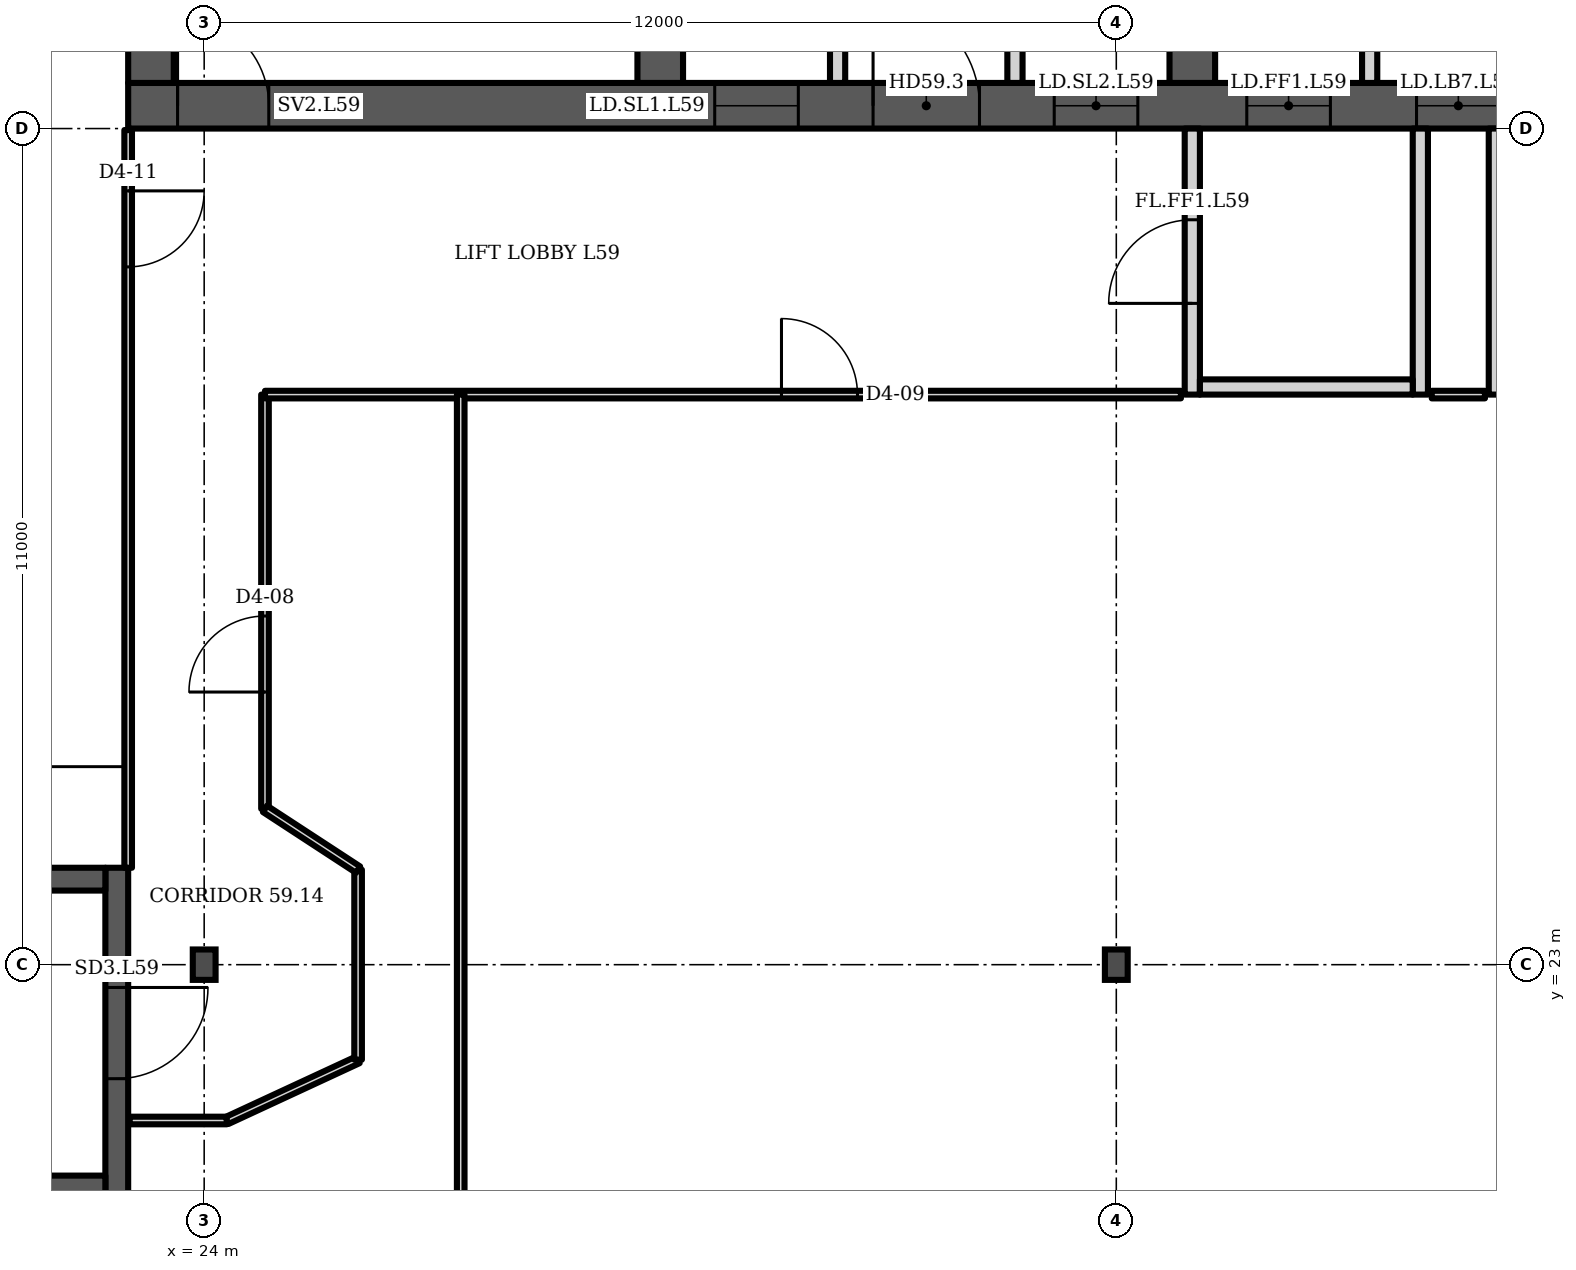
"""IFC4 building model, lengths in metres.
Left out: names, types, materials, properties, quantities, classifications, styles, units other than length and angle.
Written with IfcOpenShell. Run it as: python <this file> out.ifc"""

import sys

from ifc_helpers import new_model, si_unit, direction, frame, frame_2d, origin, origin_2d, place, context, subcontext, project, spatial, polyline, rectangle, i_section, outline, extrude, element, fill, save


model = new_model("IFC4")
c1 = context("Model", 3, precision=1e-05, world=origin(), true_north=direction((0.0, 1.0)))
c2 = subcontext(c1, "Body", "Model", "MODEL_VIEW")
j1 = project(units=[si_unit("LENGTHUNIT", "METRE"), si_unit("PLANEANGLEUNIT", "RADIAN")], contexts=[c1])
p1 = place(None, origin())
s1 = spatial("IfcSite", under=j1, at=p1, CompositionType="ELEMENT")
p2 = place(p1, origin())
s2 = spatial("IfcBuilding", under=s1, at=p2, CompositionType="ELEMENT")
p3 = place(p2, frame((0.0, 0.0, 235.9)))
s3 = spatial("IfcBuildingStorey", under=s2, at=p3, CompositionType="ELEMENT", Elevation=235.9)
p4 = place(p3, frame((23.0, 34.3, 0.0), z_axis=(0.0, 0.0, 1.0), x_axis=(1.0, 0.0, 0.0)))
e1 = element("IfcWall", 1, at=p4, inside=s3, PredefinedType="SHEAR", context=c2, shape_type="SweptSolid", body=[
    extrude(rectangle(XDim=35.0, YDim=0.6, at=frame_2d((17.5, 0.0))), origin(), (0.0, 0.0, 1.0), 3.6),
])
p5 = place(p4, frame((0.65, 0.0, 0.0)))
e2 = element("IfcOpeningElement", 2, at=p5, cuts=e1, PredefinedType="OPENING", context=c2, shape_type="SweptSolid", body=[
    extrude(rectangle(XDim=1.2, YDim=2.1, at=frame_2d((0.6, 1.05))), frame((0.0, 0.31, 0.0), z_axis=(0.0, -1.0, 0.0), x_axis=(1.0, 0.0, 0.0)), (0.0, 0.0, 1.0), 0.62),
])
p6 = place(p4, frame((7.717, 0.0, 0.0)))
e3 = element("IfcOpeningElement", 3, at=p6, cuts=e1, PredefinedType="OPENING", context=c2, shape_type="SweptSolid", body=[
    extrude(rectangle(XDim=1.1, YDim=2.1, at=frame_2d((0.55, 1.05))), frame((0.0, 0.31, 0.0), z_axis=(0.0, -1.0, 0.0), x_axis=(1.0, 0.0, 0.0)), (0.0, 0.0, 1.0), 0.62),
])
p7 = place(p4, frame((12.183, 0.0, 0.0)))
e4 = element("IfcOpeningElement", 4, at=p7, cuts=e1, PredefinedType="OPENING", context=c2, shape_type="SweptSolid", body=[
    extrude(rectangle(XDim=1.1, YDim=2.1, at=frame_2d((0.55, 1.05))), frame((0.0, 0.31, 0.0), z_axis=(0.0, -1.0, 0.0), x_axis=(1.0, 0.0, 0.0)), (0.0, 0.0, 1.0), 0.62),
])
p8 = place(p4, frame((9.8, 0.0, 0.0)))
e5 = element("IfcOpeningElement", 5, at=p8, cuts=e1, PredefinedType="OPENING", context=c2, shape_type="SweptSolid", body=[
    extrude(rectangle(XDim=1.4, YDim=2.1, at=frame_2d((0.7, 1.05))), frame((0.0, 0.31, 0.0), z_axis=(0.0, -1.0, 0.0), x_axis=(1.0, 0.0, 0.0)), (0.0, 0.0, 1.0), 0.62),
])
p9 = place(p4, frame((14.717, 0.0, 0.0)))
e6 = element("IfcOpeningElement", 6, at=p9, cuts=e1, PredefinedType="OPENING", context=c2, shape_type="SweptSolid", body=[
    extrude(rectangle(XDim=1.1, YDim=2.1, at=frame_2d((0.55, 1.05))), frame((0.0, 0.31, 0.0), z_axis=(0.0, -1.0, 0.0), x_axis=(1.0, 0.0, 0.0)), (0.0, 0.0, 1.0), 0.62),
])
p10 = place(p4, frame((16.95, 0.0, 0.0)))
e7 = element("IfcOpeningElement", 7, at=p10, cuts=e1, PredefinedType="OPENING", context=c2, shape_type="SweptSolid", body=[
    extrude(rectangle(XDim=1.1, YDim=2.1, at=frame_2d((0.55, 1.05))), frame((0.0, 0.31, 0.0), z_axis=(0.0, -1.0, 0.0), x_axis=(1.0, 0.0, 0.0)), (0.0, 0.0, 1.0), 0.62),
])
p11 = place(p4, frame((19.183, 0.0, 0.0)))
e8 = element("IfcOpeningElement", 8, at=p11, cuts=e1, PredefinedType="OPENING", context=c2, shape_type="SweptSolid", body=[
    extrude(rectangle(XDim=1.1, YDim=2.1, at=frame_2d((0.55, 1.05))), frame((0.0, 0.31, 0.0), z_axis=(0.0, -1.0, 0.0), x_axis=(1.0, 0.0, 0.0)), (0.0, 0.0, 1.0), 0.62),
])
p12 = place(p4, frame((26.15, 0.0, 0.0)))
e9 = element("IfcOpeningElement", 9, at=p12, cuts=e1, PredefinedType="OPENING", context=c2, shape_type="SweptSolid", body=[
    extrude(rectangle(XDim=1.2, YDim=2.1, at=frame_2d((0.6, 1.05))), frame((0.0, 0.31, 0.0), z_axis=(0.0, -1.0, 0.0), x_axis=(1.0, 0.0, 0.0)), (0.0, 0.0, 1.0), 0.62),
])
p13 = place(p4, frame((30.8, 0.0, 0.0)))
e10 = element("IfcOpeningElement", 10, at=p13, cuts=e1, PredefinedType="OPENING", context=c2, shape_type="SweptSolid", body=[
    extrude(rectangle(XDim=1.4, YDim=2.1, at=frame_2d((0.7, 1.05))), frame((0.0, 0.31, 0.0), z_axis=(0.0, -1.0, 0.0), x_axis=(1.0, 0.0, 0.0)), (0.0, 0.0, 1.0), 0.62),
])
p14 = place(p3, frame((23.3, 34.6, 0.0), z_axis=(0.0, 0.0, 1.0), x_axis=(0.0, 1.0, 0.0)))
e11 = element("IfcWall", 11, at=p14, inside=s3, PredefinedType="SHEAR", context=c2, shape_type="SweptSolid", body=[
    extrude(rectangle(XDim=13.585, YDim=0.6, at=frame_2d((6.792, 0.0))), origin(), (0.0, 0.0, 1.0), 3.6),
])
p15 = place(p3, frame((30.0, 34.6, 0.0), z_axis=(0.0, 0.0, 1.0), x_axis=(0.0, 1.0, 0.0)))
e12 = element("IfcWall", 12, at=p15, inside=s3, PredefinedType="SHEAR", context=c2, shape_type="SweptSolid", body=[
    extrude(rectangle(XDim=14.171, YDim=0.6, at=frame_2d((7.085, 0.0))), origin(), (0.0, 0.0, 1.0), 3.6),
])
p16 = place(p15, frame((3.8, 0.0, 0.0)))
e13 = element("IfcOpeningElement", 13, at=p16, cuts=e12, PredefinedType="OPENING", context=c2, shape_type="SweptSolid", body=[
    extrude(rectangle(XDim=1.1, YDim=2.1, at=frame_2d((0.55, 1.05))), frame((0.0, 0.31, 0.0), z_axis=(0.0, -1.0, 0.0), x_axis=(1.0, 0.0, 0.0)), (0.0, 0.0, 1.0), 0.62),
])
p17 = place(p3, frame((37.0, 34.6, 0.0), z_axis=(0.0, 0.0, 1.0), x_axis=(0.0, 1.0, 0.0)))
e14 = element("IfcWall", 14, at=p17, inside=s3, PredefinedType="SHEAR", context=c2, shape_type="SweptSolid", body=[
    extrude(rectangle(XDim=14.784, YDim=0.6, at=frame_2d((7.392, 0.0))), origin(), (0.0, 0.0, 1.0), 3.6),
])
p18 = place(p17, frame((11.302, 0.0, 0.0)))
e15 = element("IfcOpeningElement", 15, at=p18, cuts=e14, PredefinedType="OPENING", context=c2, shape_type="SweptSolid", body=[
    extrude(rectangle(XDim=1.0, YDim=2.1, at=frame_2d((0.5, 1.05))), frame((0.0, 0.31, 0.0), z_axis=(0.0, -1.0, 0.0), x_axis=(1.0, 0.0, 0.0)), (0.0, 0.0, 1.0), 0.62),
])
p19 = place(p17, frame((3.8, 0.0, 0.0)))
e16 = element("IfcOpeningElement", 16, at=p19, cuts=e14, PredefinedType="OPENING", context=c2, shape_type="SweptSolid", body=[
    extrude(rectangle(XDim=1.1, YDim=2.1, at=frame_2d((0.55, 1.05))), frame((0.0, 0.31, 0.0), z_axis=(0.0, -1.0, 0.0), x_axis=(1.0, 0.0, 0.0)), (0.0, 0.0, 1.0), 0.62),
])
for number, where, z_axis, x_axis in (
    (17, (24.0, 23.0, 0.0), (0.0, 0.0, 1.0), (1.0, 0.0, 0.0)),
    (18, (36.0, 23.0, 0.0), (0.0, 0.0, 1.0), (1.0, 0.0, 0.0)),
):
    element("IfcColumn", number, at=place(p3, frame(where, z_axis=z_axis, x_axis=x_axis)), inside=s3, PredefinedType="COLUMN", context=c2, shape_type="SweptSolid", body=[
        extrude(i_section(OverallWidth=0.3, OverallDepth=0.4, WebThickness=0.013, FlangeThickness=0.024, FilletRadius=0.027, at=origin_2d()), origin(), (0.0, 0.0, 1.0), 3.6),
    ])
p20 = place(p3, origin())
e19 = element("IfcWall", 19, at=p20, inside=s3, PredefinedType="PARTITIONING", context=c2, shape_type="SweptSolid", body=[
    extrude(outline(polyline([(32.233, 37.45), (30.3, 37.45), (30.3, 37.65), (32.233, 37.65), (32.433, 37.65), (32.433, 34.6), (32.233, 34.6), (32.233, 37.45)])), origin(), (0.0, 0.0, 1.0), 3.2),
])
p21 = place(p3, origin())
e20 = element("IfcWall", 20, at=p21, inside=s3, PredefinedType="PARTITIONING", context=c2, shape_type="SweptSolid", body=[
    extrude(outline(polyline([(34.567, 37.65), (34.767, 37.65), (36.7, 37.65), (36.7, 37.45), (34.767, 37.45), (34.767, 34.6), (34.567, 34.6), (34.567, 37.65)])), origin(), (0.0, 0.0, 1.0), 3.2),
])
p22 = place(p3, origin())
e21 = element("IfcWall", 21, at=p22, inside=s3, PredefinedType="PARTITIONING", context=c2, shape_type="SweptSolid", body=[
    extrude(outline(polyline([(41.567, 37.1), (39.433, 37.1), (39.433, 34.6), (39.233, 34.6), (39.233, 37.45), (37.3, 37.45), (37.3, 37.65), (39.233, 37.65), (39.433, 37.65), (39.433, 37.3), (41.567, 37.3), (41.567, 37.35), (41.767, 37.35), (43.7, 37.35), (43.7, 37.15), (41.767, 37.15), (41.767, 34.6), (41.567, 34.6), (41.567, 37.1)])), origin(), (0.0, 0.0, 1.0), 3.2),
])
p23 = place(p3, frame((37.0, 30.5, 0.0), z_axis=(0.0, 0.0, 1.0), x_axis=(0.0, 1.0, 0.0)))
e22 = element("IfcWall", 22, at=p23, inside=s3, PredefinedType="PARTITIONING", context=c2, shape_type="SweptSolid", body=[
    extrude(rectangle(XDim=3.5, YDim=0.2, at=frame_2d((1.75, 0.0))), origin(), (0.0, 0.0, 1.0), 3.2),
])
p24 = place(p23, frame((1.2, 0.0, 0.0)))
e23 = element("IfcOpeningElement", 23, at=p24, cuts=e22, PredefinedType="OPENING", context=c2, shape_type="SweptSolid", body=[
    extrude(rectangle(XDim=1.1, YDim=2.1, at=frame_2d((0.55, 1.05))), frame((0.0, 0.11, 0.0), z_axis=(0.0, -1.0, 0.0), x_axis=(1.0, 0.0, 0.0)), (0.0, 0.0, 1.0), 0.22),
])
p25 = place(p3, frame((40.0, 30.5, 0.0), z_axis=(0.0, 0.0, 1.0), x_axis=(0.0, 1.0, 0.0)))
e24 = element("IfcWall", 24, at=p25, inside=s3, PredefinedType="PARTITIONING", context=c2, shape_type="SweptSolid", body=[
    extrude(rectangle(XDim=3.5, YDim=0.2, at=frame_2d((1.75, 0.0))), origin(), (0.0, 0.0, 1.0), 3.2),
])
p26 = place(p3, frame((37.1, 30.6, 0.0), z_axis=(0.0, 0.0, 1.0), x_axis=(1.0, 0.0, 0.0)))
e25 = element("IfcWall", 25, at=p26, inside=s3, PredefinedType="PARTITIONING", context=c2, shape_type="SweptSolid", body=[
    extrude(rectangle(XDim=2.8, YDim=0.2, at=frame_2d((1.4, 0.0))), origin(), (0.0, 0.0, 1.0), 3.2),
])
p27 = place(p3, frame((41.0, 30.5, 0.0), z_axis=(0.0, 0.0, 1.0), x_axis=(0.0, 1.0, 0.0)))
e26 = element("IfcWall", 26, at=p27, inside=s3, PredefinedType="PARTITIONING", context=c2, shape_type="SweptSolid", body=[
    extrude(rectangle(XDim=3.5, YDim=0.2, at=frame_2d((1.75, 0.0))), origin(), (0.0, 0.0, 1.0), 3.2),
])
p28 = place(p3, frame((22.85, 19.925, 0.0), z_axis=(0.0, 0.0, 1.0), x_axis=(0.0, 1.0, 0.0)))
e27 = element("IfcWall", 27, at=p28, inside=s3, PredefinedType="SHEAR", context=c2, shape_type="SweptSolid", body=[
    extrude(rectangle(XDim=4.35, YDim=0.3, at=frame_2d((2.175, 0.0))), origin(), (0.0, 0.0, 1.0), 3.2),
])
p29 = place(p28, frame((1.575, 0.0, 0.0)))
e28 = element("IfcOpeningElement", 28, at=p29, cuts=e27, PredefinedType="OPENING", context=c2, shape_type="SweptSolid", body=[
    extrude(rectangle(XDim=1.2, YDim=2.1, at=frame_2d((0.6, 1.05))), frame((0.0, 0.16, 0.0), z_axis=(0.0, -1.0, 0.0), x_axis=(1.0, 0.0, 0.0)), (0.0, 0.0, 1.0), 0.32),
])
p30 = place(p3, frame((23.0, 24.275, 0.0), z_axis=(0.0, 0.0, 1.0), x_axis=(0.0, 1.0, 0.0)))
e29 = element("IfcWall", 29, at=p30, inside=s3, PredefinedType="PARTITIONING", context=c2, shape_type="SweptSolid", body=[
    extrude(rectangle(XDim=9.705, YDim=0.1, at=frame_2d((4.853, 0.0))), origin(), (0.0, 0.0, 1.0), 3.2),
])
p31 = place(p30, frame((7.905, 0.0, 0.0)))
e30 = element("IfcOpeningElement", 30, at=p31, cuts=e29, PredefinedType="OPENING", context=c2, shape_type="SweptSolid", body=[
    extrude(rectangle(XDim=1.0, YDim=2.1, at=frame_2d((0.5, 1.05))), frame((0.0, 0.06, 0.0), z_axis=(0.0, -1.0, 0.0), x_axis=(1.0, 0.0, 0.0)), (0.0, 0.0, 1.0), 0.12),
])
p32 = place(p3, frame((23.02, 20.95, 0.0), z_axis=(0.0, 0.0, 1.0), x_axis=(1.0, 0.0, 0.0)))
e31 = element("IfcWall", 31, at=p32, inside=s3, PredefinedType="PARTITIONING", context=c2, shape_type="SweptSolid", body=[
    extrude(rectangle(XDim=1.28, YDim=0.1, at=frame_2d((0.64, 0.0))), origin(), (0.0, 0.0, 1.0), 3.2),
])
p33 = place(p3, frame((24.3, 20.95, 0.0), z_axis=(0.0, 0.0, 1.0), x_axis=(0.907168, 0.420777, 0.0)))
e32 = element("IfcWall", 32, at=p33, inside=s3, PredefinedType="PARTITIONING", context=c2, shape_type="SweptSolid", body=[
    extrude(rectangle(XDim=1.901, YDim=0.1, at=frame_2d((0.951, 0.0))), origin(), (0.0, 0.0, 1.0), 3.2),
])
p34 = place(p3, frame((24.8, 25.05, 0.0), z_axis=(0.0, 0.0, 1.0), x_axis=(0.0, 1.0, 0.0)))
e33 = element("IfcWall", 33, at=p34, inside=s3, PredefinedType="PARTITIONING", context=c2, shape_type="SweptSolid", body=[
    extrude(rectangle(XDim=5.45, YDim=0.1, at=frame_2d((2.725, 0.0))), origin(), (0.0, 0.0, 1.0), 3.2),
])
p35 = place(p34, frame((1.537, 0.0, 0.0)))
e34 = element("IfcOpeningElement", 34, at=p35, cuts=e33, PredefinedType="OPENING", context=c2, shape_type="SweptSolid", body=[
    extrude(rectangle(XDim=1.0, YDim=2.1, at=frame_2d((0.5, 1.05))), frame((0.0, 0.06, 0.0), z_axis=(0.0, -1.0, 0.0), x_axis=(1.0, 0.0, 0.0)), (0.0, 0.0, 1.0), 0.12),
])
p36 = place(p3, frame((24.8, 30.5, 0.0), z_axis=(0.0, 0.0, 1.0), x_axis=(1.0, 0.0, 0.0)))
e35 = element("IfcWall", 35, at=p36, inside=s3, PredefinedType="PARTITIONING", context=c2, shape_type="SweptSolid", body=[
    extrude(rectangle(XDim=12.05, YDim=0.1, at=frame_2d((6.025, 0.0))), origin(), (0.0, 0.0, 1.0), 3.2),
])
p37 = place(p36, frame((6.795, 0.0, 0.0)))
e36 = element("IfcOpeningElement", 36, at=p37, cuts=e35, PredefinedType="OPENING", context=c2, shape_type="SweptSolid", body=[
    extrude(rectangle(XDim=1.0, YDim=2.1, at=frame_2d((0.5, 1.05))), frame((0.0, 0.06, 0.0), z_axis=(0.0, -1.0, 0.0), x_axis=(1.0, 0.0, 0.0)), (0.0, 0.0, 1.0), 0.12),
])
p38 = place(p3, frame((26.025, 21.75, 0.0), z_axis=(0.0, 0.0, 1.0), x_axis=(0.0, 1.0, 0.0)))
e37 = element("IfcWall", 37, at=p38, inside=s3, PredefinedType="PARTITIONING", context=c2, shape_type="SweptSolid", body=[
    extrude(rectangle(XDim=2.5, YDim=0.1, at=frame_2d((1.25, 0.0))), origin(), (0.0, 0.0, 1.0), 3.2),
])
p39 = place(p3, frame((26.025, 24.25, 0.0), z_axis=(0.0, 0.0, 1.0), x_axis=(-0.837222, 0.546856, 0.0)))
e38 = element("IfcWall", 38, at=p39, inside=s3, PredefinedType="PARTITIONING", context=c2, shape_type="SweptSolid", body=[
    extrude(rectangle(XDim=1.463, YDim=0.1, at=frame_2d((0.731, 0.0))), origin(), (0.0, 0.0, 1.0), 3.2),
])
p40 = place(p3, frame((27.375, 5.915, 0.0), z_axis=(0.0, 0.0, 1.0), x_axis=(0.0, 1.0, 0.0)))
e39 = element("IfcWall", 39, at=p40, inside=s3, PredefinedType="PARTITIONING", context=c2, shape_type="SweptSolid", body=[
    extrude(rectangle(XDim=24.585, YDim=0.1, at=frame_2d((12.292, 0.0))), origin(), (0.0, 0.0, 1.0), 3.2),
])
p41 = place(p3, frame((40.15, 30.5, 0.0), z_axis=(0.0, 0.0, 1.0), x_axis=(1.0, 0.0, 0.0)))
e40 = element("IfcWall", 40, at=p41, inside=s3, PredefinedType="PARTITIONING", context=c2, shape_type="SweptSolid", body=[
    extrude(rectangle(XDim=0.7, YDim=0.1, at=frame_2d((0.35, 0.0))), origin(), (0.0, 0.0, 1.0), 3.2),
])
for number, where, z_axis, x_axis in (
    (41, (15.2, 20.075, 0.0), (0.0, 0.0, 1.0), (1.0, 0.0, 0.0)),
    (42, (15.2, 24.125, 0.0), (0.0, 0.0, 1.0), (1.0, 0.0, 0.0)),
):
    element("IfcWall", number, at=place(p3, frame(where, z_axis=z_axis, x_axis=x_axis)), inside=s3, PredefinedType="SHEAR", context=c2, shape_type="SweptSolid", body=[
        extrude(rectangle(XDim=7.5, YDim=0.3, at=frame_2d((3.75, 0.0))), origin(), (0.0, 0.0, 1.0), 3.2),
    ])
p42 = place(p5, origin())
e43 = element("IfcDoor", 43, at=p42, inside=s3, OperationType="SINGLE_SWING_LEFT", PredefinedType="DOOR", context=c2, shape_type="SweptSolid", body=[
    extrude(rectangle(XDim=1.2, YDim=2.1, at=frame_2d((0.6, 1.05))), frame((0.0, 0.025, 0.0), z_axis=(0.0, -1.0, 0.0), x_axis=(1.0, 0.0, 0.0)), (0.0, 0.0, 1.0), 0.05),
])
fill(e2, e43)
p43 = place(p6, origin())
e44 = element("IfcDoor", 44, at=p43, inside=s3, OperationType="DOUBLE_DOOR_SLIDING", PredefinedType="DOOR", context=c2, shape_type="SweptSolid", body=[
    extrude(rectangle(XDim=1.1, YDim=2.1, at=frame_2d((0.55, 1.05))), frame((0.0, 0.025, 0.0), z_axis=(0.0, -1.0, 0.0), x_axis=(1.0, 0.0, 0.0)), (0.0, 0.0, 1.0), 0.05),
])
fill(e3, e44)
p44 = place(p7, origin())
e45 = element("IfcDoor", 45, at=p44, inside=s3, OperationType="DOUBLE_DOOR_SLIDING", PredefinedType="DOOR", context=c2, shape_type="SweptSolid", body=[
    extrude(rectangle(XDim=1.1, YDim=2.1, at=frame_2d((0.55, 1.05))), frame((0.0, 0.025, 0.0), z_axis=(0.0, -1.0, 0.0), x_axis=(1.0, 0.0, 0.0)), (0.0, 0.0, 1.0), 0.05),
])
fill(e4, e45)
p45 = place(p8, origin())
e46 = element("IfcDoor", 46, at=p45, inside=s3, OperationType="DOUBLE_DOOR_SINGLE_SWING", PredefinedType="DOOR", context=c2, shape_type="SweptSolid", body=[
    extrude(rectangle(XDim=1.4, YDim=2.1, at=frame_2d((0.7, 1.05))), frame((0.0, 0.025, 0.0), z_axis=(0.0, -1.0, 0.0), x_axis=(1.0, 0.0, 0.0)), (0.0, 0.0, 1.0), 0.05),
])
fill(e5, e46)
p46 = place(p9, origin())
e47 = element("IfcDoor", 47, at=p46, inside=s3, OperationType="DOUBLE_DOOR_SLIDING", PredefinedType="DOOR", context=c2, shape_type="SweptSolid", body=[
    extrude(rectangle(XDim=1.1, YDim=2.1, at=frame_2d((0.55, 1.05))), frame((0.0, 0.025, 0.0), z_axis=(0.0, -1.0, 0.0), x_axis=(1.0, 0.0, 0.0)), (0.0, 0.0, 1.0), 0.05),
])
fill(e6, e47)
p47 = place(p10, origin())
e48 = element("IfcDoor", 48, at=p47, inside=s3, OperationType="DOUBLE_DOOR_SLIDING", PredefinedType="DOOR", context=c2, shape_type="SweptSolid", body=[
    extrude(rectangle(XDim=1.1, YDim=2.1, at=frame_2d((0.55, 1.05))), frame((0.0, 0.025, 0.0), z_axis=(0.0, -1.0, 0.0), x_axis=(1.0, 0.0, 0.0)), (0.0, 0.0, 1.0), 0.05),
])
fill(e7, e48)
p48 = place(p24, origin())
e49 = element("IfcDoor", 49, at=p48, inside=s3, OperationType="SINGLE_SWING_LEFT", PredefinedType="DOOR", context=c2, shape_type="SweptSolid", body=[
    extrude(rectangle(XDim=1.1, YDim=2.1, at=frame_2d((0.55, 1.05))), frame((0.0, 0.025, 0.0), z_axis=(0.0, -1.0, 0.0), x_axis=(1.0, 0.0, 0.0)), (0.0, 0.0, 1.0), 0.05),
])
fill(e23, e49)
p49 = place(p29, origin())
e50 = element("IfcDoor", 50, at=p49, inside=s3, OperationType="SINGLE_SWING_RIGHT", PredefinedType="DOOR", context=c2, shape_type="SweptSolid", body=[
    extrude(rectangle(XDim=1.2, YDim=2.1, at=frame_2d((0.6, 1.05))), frame((0.0, 0.025, 0.0), z_axis=(0.0, -1.0, 0.0), x_axis=(1.0, 0.0, 0.0)), (0.0, 0.0, 1.0), 0.05),
])
fill(e28, e50)
p50 = place(p35, origin())
e51 = element("IfcDoor", 51, at=p50, inside=s3, OperationType="SINGLE_SWING_LEFT", PredefinedType="DOOR", context=c2, shape_type="SweptSolid", body=[
    extrude(rectangle(XDim=1.0, YDim=2.1, at=frame_2d((0.5, 1.05))), frame((0.0, 0.025, 0.0), z_axis=(0.0, -1.0, 0.0), x_axis=(1.0, 0.0, 0.0)), (0.0, 0.0, 1.0), 0.05),
])
fill(e34, e51)
p51 = place(p37, origin())
e52 = element("IfcDoor", 52, at=p51, inside=s3, OperationType="SINGLE_SWING_LEFT", PredefinedType="DOOR", context=c2, shape_type="SweptSolid", body=[
    extrude(rectangle(XDim=1.0, YDim=2.1, at=frame_2d((0.5, 1.05))), frame((0.0, 0.025, 0.0), z_axis=(0.0, -1.0, 0.0), x_axis=(1.0, 0.0, 0.0)), (0.0, 0.0, 1.0), 0.05),
])
fill(e36, e52)
p52 = place(p31, origin())
e53 = element("IfcDoor", 53, at=p52, inside=s3, OperationType="SINGLE_SWING_RIGHT", PredefinedType="DOOR", context=c2, shape_type="SweptSolid", body=[
    extrude(rectangle(XDim=1.0, YDim=2.1, at=frame_2d((0.5, 1.05))), frame((0.0, 0.025, 0.0), z_axis=(0.0, -1.0, 0.0), x_axis=(1.0, 0.0, 0.0)), (0.0, 0.0, 1.0), 0.05),
])
fill(e30, e53)
save(model, sys.argv[1])
